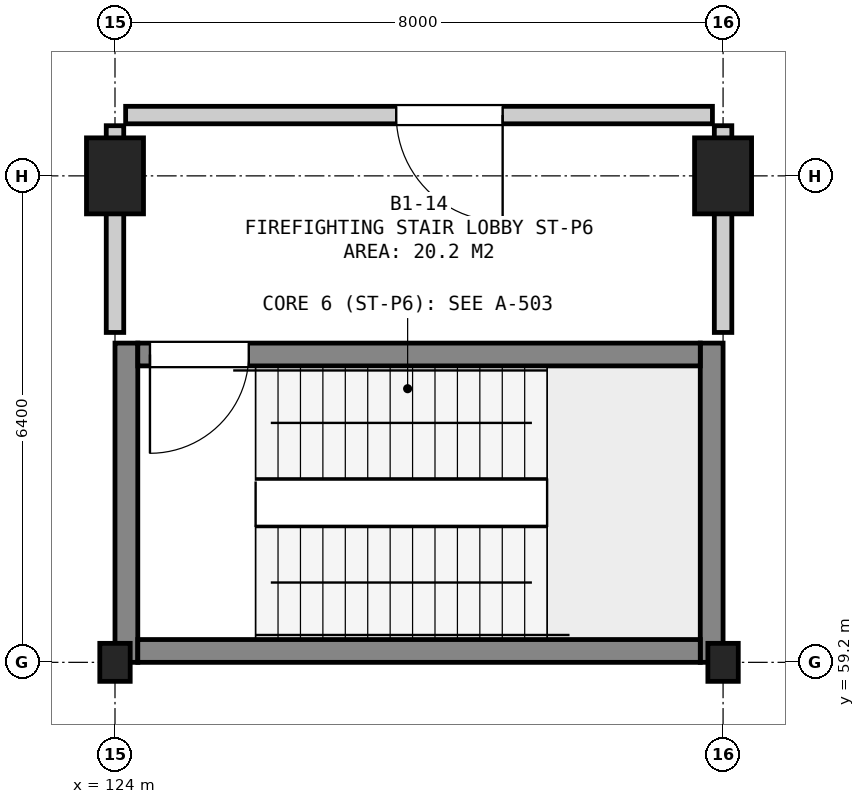
"""IFC4 building model, lengths in metres.
Left out: names, types, materials, properties, quantities, classifications, styles, units other than length and angle.
Written with IfcOpenShell. Run it as: python <this file> out.ifc"""

import sys

from ifc_helpers import new_model, si_unit, direction, frame, frame_2d, origin, origin_2d, place, context, subcontext, project, spatial, rectangle, extrude, element, fill, save


model = new_model("IFC4")
c1 = context("Model", 3, precision=1e-05, world=origin(), true_north=direction((0.0, 1.0)))
c2 = subcontext(c1, "Body", "Model", "MODEL_VIEW")
j1 = project(units=[si_unit("LENGTHUNIT", "METRE"), si_unit("PLANEANGLEUNIT", "RADIAN")], contexts=[c1])
p1 = place(None, origin())
s1 = spatial("IfcSite", under=j1, at=p1, CompositionType="ELEMENT")
p2 = place(p1, origin())
s2 = spatial("IfcBuilding", under=s1, at=p2, CompositionType="ELEMENT")
p3 = place(p2, frame((0.0, 0.0, -4.5)))
s3 = spatial("IfcBuildingStorey", under=s2, at=p3, CompositionType="ELEMENT", Elevation=-4.5)
p4 = place(p3, frame((124.0, 59.2, 0.0), z_axis=(0.0, 0.0, 1.0), x_axis=(1.0, 0.0, 0.0)))
e1 = element("IfcColumn", 1, at=p4, inside=s3, PredefinedType="COLUMN", context=c2, shape_type="SweptSolid", body=[
    extrude(rectangle(XDim=0.4, YDim=0.5, at=origin_2d()), origin(), (0.0, 0.0, 1.0), 4.5),
])
p5 = place(p3, frame((124.0, 65.6, 0.0), z_axis=(0.0, 0.0, 1.0), x_axis=(1.0, 0.0, 0.0)))
e2 = element("IfcColumn", 2, at=p5, inside=s3, PredefinedType="COLUMN", context=c2, shape_type="SweptSolid", body=[
    extrude(rectangle(XDim=0.75, YDim=1.0, at=origin_2d()), origin(), (0.0, 0.0, 1.0), 4.5),
])
p6 = place(p3, frame((132.0, 59.2, 0.0), z_axis=(0.0, 0.0, 1.0), x_axis=(1.0, 0.0, 0.0)))
e3 = element("IfcColumn", 3, at=p6, inside=s3, PredefinedType="COLUMN", context=c2, shape_type="SweptSolid", body=[
    extrude(rectangle(XDim=0.4, YDim=0.5, at=origin_2d()), origin(), (0.0, 0.0, 1.0), 4.5),
])
p7 = place(p3, frame((132.0, 65.6, 0.0), z_axis=(0.0, 0.0, 1.0), x_axis=(1.0, 0.0, 0.0)))
e4 = element("IfcColumn", 4, at=p7, inside=s3, PredefinedType="COLUMN", context=c2, shape_type="SweptSolid", body=[
    extrude(rectangle(XDim=0.75, YDim=1.0, at=origin_2d()), origin(), (0.0, 0.0, 1.0), 4.5),
])
for number, where, z_axis, x_axis in (
    (5, (124.15, 59.2, 0.0), (0.0, 0.0, 1.0), (0.0, 1.0, 0.0)),
    (6, (131.85, 59.2, 0.0), (0.0, 0.0, 1.0), (0.0, 1.0, 0.0)),
):
    element("IfcWall", number, at=place(p3, frame(where, z_axis=z_axis, x_axis=x_axis)), inside=s3, PredefinedType="SHEAR", context=c2, shape_type="SweptSolid", body=[
        extrude(rectangle(XDim=4.2, YDim=0.3, at=frame_2d((2.1, 0.0))), origin(), (0.0, 0.0, 1.0), 4.08),
    ])
p8 = place(p3, frame((124.3, 59.35, 0.0), z_axis=(0.0, 0.0, 1.0), x_axis=(1.0, 0.0, 0.0)))
e7 = element("IfcWall", 7, at=p8, inside=s3, PredefinedType="SHEAR", context=c2, shape_type="SweptSolid", body=[
    extrude(rectangle(XDim=7.4, YDim=0.3, at=frame_2d((3.7, 0.0))), origin(), (0.0, 0.0, 1.0), 4.08),
])
p9 = place(p3, frame((124.3, 63.25, 0.0), z_axis=(0.0, 0.0, 1.0), x_axis=(1.0, 0.0, 0.0)))
e8 = element("IfcWall", 8, at=p9, inside=s3, PredefinedType="SHEAR", context=c2, shape_type="SweptSolid", body=[
    extrude(rectangle(XDim=7.4, YDim=0.3, at=frame_2d((3.7, 0.0))), origin(), (0.0, 0.0, 1.0), 4.08),
])
p10 = place(p9, frame((0.16, 0.0, 0.0)))
e9 = element("IfcOpeningElement", 9, at=p10, cuts=e8, PredefinedType="OPENING", context=c2, shape_type="SweptSolid", body=[
    extrude(rectangle(XDim=1.3, YDim=2.18, at=frame_2d((0.65, 1.09))), frame((0.0, 0.162, 0.0), z_axis=(0.0, -1.0, 0.0), x_axis=(1.0, 0.0, 0.0)), (0.0, 0.0, 1.0), 0.324),
])
p11 = place(p3, frame((124.14, 66.4, 0.0), z_axis=(0.0, 0.0, 1.0), x_axis=(1.0, 0.0, 0.0)))
e10 = element("IfcWall", 10, at=p11, inside=s3, PredefinedType="SOLIDWALL", context=c2, shape_type="SweptSolid", body=[
    extrude(rectangle(XDim=7.72, YDim=0.23, at=frame_2d((3.86, 0.0))), origin(), (0.0, 0.0, 1.0), 4.08),
])
p12 = place(p11, frame((3.56, 0.0, 0.0)))
e11 = element("IfcOpeningElement", 11, at=p12, cuts=e10, PredefinedType="OPENING", context=c2, shape_type="SweptSolid", body=[
    extrude(rectangle(XDim=1.4, YDim=2.2, at=frame_2d((0.7, 1.1))), frame((0.0, 0.127, 0.0), z_axis=(0.0, -1.0, 0.0), x_axis=(1.0, 0.0, 0.0)), (0.0, 0.0, 1.0), 0.254),
])
p13 = place(p3, frame((124.0, 63.54, 0.0), z_axis=(0.0, 0.0, 1.0), x_axis=(0.0, 1.0, 0.0)))
e12 = element("IfcWall", 12, at=p13, inside=s3, PredefinedType="SOLIDWALL", context=c2, shape_type="SweptSolid", body=[
    extrude(rectangle(XDim=2.72, YDim=0.23, at=frame_2d((1.36, 0.0))), origin(), (0.0, 0.0, 1.0), 3.525),
])
p14 = place(p3, frame((132.0, 63.54, 0.0), z_axis=(0.0, 0.0, 1.0), x_axis=(0.0, 1.0, 0.0)))
e13 = element("IfcWall", 13, at=p14, inside=s3, PredefinedType="SOLIDWALL", context=c2, shape_type="SweptSolid", body=[
    extrude(rectangle(XDim=2.72, YDim=0.23, at=frame_2d((1.36, 0.0))), origin(), (0.0, 0.0, 1.0), 3.575),
])
p15 = place(p10, frame((1.3, 0.0, 0.0), z_axis=(0.0, 0.0, 1.0), x_axis=(-1.0, 0.0, 0.0)))
e14 = element("IfcDoor", 14, at=p15, inside=s3, OperationType="SINGLE_SWING_RIGHT", PredefinedType="DOOR", context=c2, shape_type="SweptSolid", body=[
    extrude(rectangle(XDim=1.3, YDim=2.18, at=frame_2d((0.65, 1.09))), frame((0.0, 0.025, 0.0), z_axis=(0.0, -1.0, 0.0), x_axis=(1.0, 0.0, 0.0)), (0.0, 0.0, 1.0), 0.05),
])
fill(e9, e14)
p16 = place(p12, frame((1.4, 0.0, 0.0), z_axis=(0.0, 0.0, 1.0), x_axis=(-1.0, 0.0, 0.0)))
e15 = element("IfcDoor", 15, at=p16, inside=s3, OperationType="SINGLE_SWING_LEFT", PredefinedType="DOOR", context=c2, shape_type="SweptSolid", body=[
    extrude(rectangle(XDim=1.4, YDim=2.2, at=frame_2d((0.7, 1.1))), frame((0.0, 0.025, 0.0), z_axis=(0.0, -1.0, 0.0), x_axis=(1.0, 0.0, 0.0)), (0.0, 0.0, 1.0), 0.05),
])
fill(e11, e15)
save(model, sys.argv[1])
